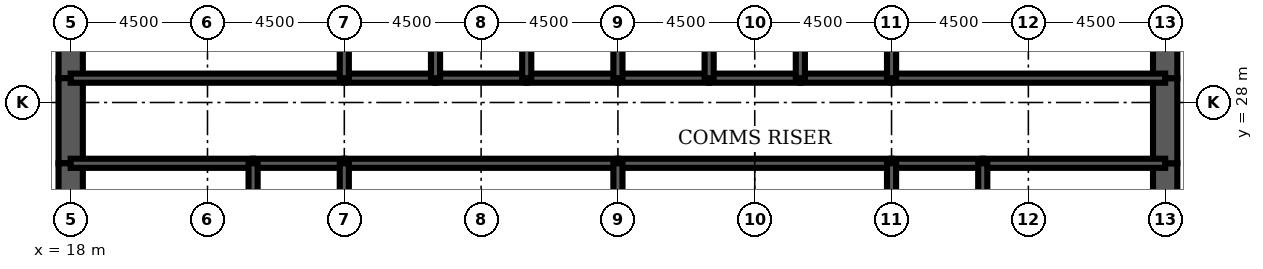
"""IFC4 building model, lengths in metres.
Left out: names, types, materials, properties, quantities, classifications, styles, units other than length and angle.
Written with IfcOpenShell. Run it as: python <this file> out.ifc"""

import sys

from ifc_helpers import new_model, si_unit, direction, frame, frame_2d, origin, place, context, subcontext, project, spatial, rectangle, extrude, element, fill, save


model = new_model("IFC4")
c1 = context("Model", 3, precision=1e-05, world=origin(), true_north=direction((0.0, 1.0)))
c2 = subcontext(c1, "Body", "Model", "MODEL_VIEW")
j1 = project(units=[si_unit("LENGTHUNIT", "METRE"), si_unit("PLANEANGLEUNIT", "RADIAN")], contexts=[c1])
p1 = place(None, origin())
s1 = spatial("IfcSite", under=j1, at=p1, CompositionType="ELEMENT")
p2 = place(p1, origin())
s2 = spatial("IfcBuilding", under=s1, at=p2, CompositionType="ELEMENT")
p3 = place(p2, frame((0.0, 0.0, 265.6)))
s3 = spatial("IfcBuildingStorey", under=s2, at=p3, CompositionType="ELEMENT", Elevation=265.6)
p4 = place(p3, frame((18.0, 32.0, 0.0), z_axis=(0.0, 0.0, 1.0), x_axis=(0.0, -1.0, 0.0)))
e1 = element("IfcWall", 1, at=p4, inside=s3, PredefinedType="SHEAR", context=c2, shape_type="SweptSolid", body=[
    extrude(rectangle(XDim=3.2, YDim=0.8, at=frame_2d((1.6, 0.0))), origin(), (0.0, 0.0, 1.0), 5.5),
])
p5 = place(p3, frame((18.0, 28.8, 0.0), z_axis=(0.0, 0.0, 1.0), x_axis=(0.0, -1.0, 0.0)))
e2 = element("IfcWall", 2, at=p5, inside=s3, PredefinedType="SHEAR", context=c2, shape_type="SweptSolid", body=[
    extrude(rectangle(XDim=2.8, YDim=0.8, at=frame_2d((1.4, 0.0))), origin(), (0.0, 0.0, 1.0), 5.5),
])
p6 = place(p5, frame((0.4, 0.0, 0.0)))
e3 = element("IfcOpeningElement", 3, at=p6, cuts=e2, PredefinedType="OPENING", context=c2, shape_type="SweptSolid", body=[
    extrude(rectangle(XDim=1.8, YDim=2.1, at=frame_2d((0.9, 1.05))), frame((0.0, 0.41, 0.0), z_axis=(0.0, -1.0, 0.0), x_axis=(1.0, 0.0, 0.0)), (0.0, 0.0, 1.0), 0.82),
])
for number, where, z_axis, x_axis in (
    (4, (18.0, 26.0, 0.0), (0.0, 0.0, 1.0), (0.0, -1.0, 0.0)),
    (5, (54.0, 22.0, 0.0), (0.0, 0.0, 1.0), (0.0, 1.0, 0.0)),
):
    element("IfcWall", number, at=place(p3, frame(where, z_axis=z_axis, x_axis=x_axis)), inside=s3, PredefinedType="SHEAR", context=c2, shape_type="SweptSolid", body=[
        extrude(rectangle(XDim=4.0, YDim=0.8, at=frame_2d((2.0, 0.0))), origin(), (0.0, 0.0, 1.0), 5.5),
    ])
p7 = place(p3, frame((54.0, 26.0, 0.0), z_axis=(0.0, 0.0, 1.0), x_axis=(0.0, 1.0, 0.0)))
e6 = element("IfcWall", 6, at=p7, inside=s3, PredefinedType="SHEAR", context=c2, shape_type="SweptSolid", body=[
    extrude(rectangle(XDim=2.8, YDim=0.8, at=frame_2d((1.4, 0.0))), origin(), (0.0, 0.0, 1.0), 5.5),
])
p8 = place(p7, frame((0.6, 0.0, 0.0)))
e7 = element("IfcOpeningElement", 7, at=p8, cuts=e6, PredefinedType="OPENING", context=c2, shape_type="SweptSolid", body=[
    extrude(rectangle(XDim=1.8, YDim=2.1, at=frame_2d((0.9, 1.05))), frame((0.0, 0.41, 0.0), z_axis=(0.0, -1.0, 0.0), x_axis=(1.0, 0.0, 0.0)), (0.0, 0.0, 1.0), 0.82),
])
p9 = place(p3, frame((54.0, 28.8, 0.0), z_axis=(0.0, 0.0, 1.0), x_axis=(0.0, 1.0, 0.0)))
e8 = element("IfcWall", 8, at=p9, inside=s3, PredefinedType="SHEAR", context=c2, shape_type="SweptSolid", body=[
    extrude(rectangle(XDim=3.2, YDim=0.8, at=frame_2d((1.6, 0.0))), origin(), (0.0, 0.0, 1.0), 5.5),
])
p10 = place(p3, frame((18.0, 28.8, 0.0), z_axis=(0.0, 0.0, 1.0), x_axis=(1.0, 0.0, 0.0)))
e9 = element("IfcWall", 9, at=p10, inside=s3, PredefinedType="SOLIDWALL", context=c2, shape_type="SweptSolid", body=[
    extrude(rectangle(XDim=9.0, YDim=0.3, at=frame_2d((4.5, 0.0))), origin(), (0.0, 0.0, 1.0), 5.5),
])
p11 = place(p10, frame((0.65, 0.0, 0.0)))
e10 = element("IfcOpeningElement", 10, at=p11, cuts=e9, PredefinedType="OPENING", context=c2, shape_type="SweptSolid", body=[
    extrude(rectangle(XDim=1.0, YDim=2.1, at=frame_2d((0.5, 1.05))), frame((0.0, 0.16, 0.0), z_axis=(0.0, -1.0, 0.0), x_axis=(1.0, 0.0, 0.0)), (0.0, 0.0, 1.0), 0.32),
])
p12 = place(p3, frame((27.0, 28.8, 0.0), z_axis=(0.0, 0.0, 1.0), x_axis=(1.0, 0.0, 0.0)))
e11 = element("IfcWall", 11, at=p12, inside=s3, PredefinedType="SOLIDWALL", context=c2, shape_type="SweptSolid", body=[
    extrude(rectangle(XDim=3.0, YDim=0.3, at=frame_2d((1.5, 0.0))), origin(), (0.0, 0.0, 1.0), 5.5),
])
p13 = place(p12, frame((0.95, 0.0, 0.0)))
e12 = element("IfcOpeningElement", 12, at=p13, cuts=e11, PredefinedType="OPENING", context=c2, shape_type="SweptSolid", body=[
    extrude(rectangle(XDim=1.1, YDim=2.2, at=frame_2d((0.55, 1.1))), frame((0.0, 0.16, 0.0), z_axis=(0.0, -1.0, 0.0), x_axis=(1.0, 0.0, 0.0)), (0.0, 0.0, 1.0), 0.32),
])
for number, where, z_axis, x_axis in (
    (13, (30.0, 28.8, 0.0), (0.0, 0.0, 1.0), (1.0, 0.0, 0.0)),
    (14, (33.0, 28.8, 0.0), (0.0, 0.0, 1.0), (1.0, 0.0, 0.0)),
    (15, (36.0, 28.8, 0.0), (0.0, 0.0, 1.0), (1.0, 0.0, 0.0)),
    (16, (39.0, 28.8, 0.0), (0.0, 0.0, 1.0), (1.0, 0.0, 0.0)),
):
    element("IfcWall", number, at=place(p3, frame(where, z_axis=z_axis, x_axis=x_axis)), inside=s3, PredefinedType="SOLIDWALL", context=c2, shape_type="SweptSolid", body=[
        extrude(rectangle(XDim=3.0, YDim=0.3, at=frame_2d((1.5, 0.0))), origin(), (0.0, 0.0, 1.0), 5.5),
    ])
p14 = place(p3, frame((42.0, 28.8, 0.0), z_axis=(0.0, 0.0, 1.0), x_axis=(1.0, 0.0, 0.0)))
e17 = element("IfcWall", 17, at=p14, inside=s3, PredefinedType="SOLIDWALL", context=c2, shape_type="SweptSolid", body=[
    extrude(rectangle(XDim=3.0, YDim=0.3, at=frame_2d((1.5, 0.0))), origin(), (0.0, 0.0, 1.0), 5.5),
])
p15 = place(p14, frame((0.95, 0.0, 0.0)))
e18 = element("IfcOpeningElement", 18, at=p15, cuts=e17, PredefinedType="OPENING", context=c2, shape_type="SweptSolid", body=[
    extrude(rectangle(XDim=1.1, YDim=2.2, at=frame_2d((0.55, 1.1))), frame((0.0, 0.16, 0.0), z_axis=(0.0, -1.0, 0.0), x_axis=(1.0, 0.0, 0.0)), (0.0, 0.0, 1.0), 0.32),
])
p16 = place(p3, frame((45.0, 28.8, 0.0), z_axis=(0.0, 0.0, 1.0), x_axis=(1.0, 0.0, 0.0)))
e19 = element("IfcWall", 19, at=p16, inside=s3, PredefinedType="SOLIDWALL", context=c2, shape_type="SweptSolid", body=[
    extrude(rectangle(XDim=9.0, YDim=0.3, at=frame_2d((4.5, 0.0))), origin(), (0.0, 0.0, 1.0), 5.5),
])
p17 = place(p16, frame((7.35, 0.0, 0.0)))
e20 = element("IfcOpeningElement", 20, at=p17, cuts=e19, PredefinedType="OPENING", context=c2, shape_type="SweptSolid", body=[
    extrude(rectangle(XDim=1.0, YDim=2.1, at=frame_2d((0.5, 1.05))), frame((0.0, 0.16, 0.0), z_axis=(0.0, -1.0, 0.0), x_axis=(1.0, 0.0, 0.0)), (0.0, 0.0, 1.0), 0.32),
])
p18 = place(p3, frame((18.0, 26.0, 0.0), z_axis=(0.0, 0.0, 1.0), x_axis=(1.0, 0.0, 0.0)))
e21 = element("IfcWall", 21, at=p18, inside=s3, PredefinedType="SOLIDWALL", context=c2, shape_type="SweptSolid", body=[
    extrude(rectangle(XDim=6.0, YDim=0.3, at=frame_2d((3.0, 0.0))), origin(), (0.0, 0.0, 1.0), 5.5),
])
p19 = place(p3, frame((24.0, 26.0, 0.0), z_axis=(0.0, 0.0, 1.0), x_axis=(1.0, 0.0, 0.0)))
e22 = element("IfcWall", 22, at=p19, inside=s3, PredefinedType="SOLIDWALL", context=c2, shape_type="SweptSolid", body=[
    extrude(rectangle(XDim=3.0, YDim=0.3, at=frame_2d((1.5, 0.0))), origin(), (0.0, 0.0, 1.0), 5.5),
])
for number, where, z_axis, x_axis in (
    (23, (27.0, 26.0, 0.0), (0.0, 0.0, 1.0), (1.0, 0.0, 0.0)),
    (24, (36.0, 26.0, 0.0), (0.0, 0.0, 1.0), (1.0, 0.0, 0.0)),
):
    element("IfcWall", number, at=place(p3, frame(where, z_axis=z_axis, x_axis=x_axis)), inside=s3, PredefinedType="SOLIDWALL", context=c2, shape_type="SweptSolid", body=[
        extrude(rectangle(XDim=9.0, YDim=0.3, at=frame_2d((4.5, 0.0))), origin(), (0.0, 0.0, 1.0), 5.5),
    ])
p20 = place(p3, frame((45.0, 26.0, 0.0), z_axis=(0.0, 0.0, 1.0), x_axis=(1.0, 0.0, 0.0)))
e25 = element("IfcWall", 25, at=p20, inside=s3, PredefinedType="SOLIDWALL", context=c2, shape_type="SweptSolid", body=[
    extrude(rectangle(XDim=3.0, YDim=0.3, at=frame_2d((1.5, 0.0))), origin(), (0.0, 0.0, 1.0), 5.5),
])
p21 = place(p3, frame((48.0, 26.0, 0.0), z_axis=(0.0, 0.0, 1.0), x_axis=(1.0, 0.0, 0.0)))
e26 = element("IfcWall", 26, at=p21, inside=s3, PredefinedType="SOLIDWALL", context=c2, shape_type="SweptSolid", body=[
    extrude(rectangle(XDim=6.0, YDim=0.3, at=frame_2d((3.0, 0.0))), origin(), (0.0, 0.0, 1.0), 5.5),
])
for number, where, z_axis, x_axis in (
    (27, (27.0, 28.8, 0.0), (0.0, 0.0, 1.0), (0.0, 1.0, 0.0)),
    (28, (30.0, 28.8, 0.0), (0.0, 0.0, 1.0), (0.0, 1.0, 0.0)),
    (29, (33.0, 28.8, 0.0), (0.0, 0.0, 1.0), (0.0, 1.0, 0.0)),
    (30, (36.0, 28.8, 0.0), (0.0, 0.0, 1.0), (0.0, 1.0, 0.0)),
    (31, (39.0, 28.8, 0.0), (0.0, 0.0, 1.0), (0.0, 1.0, 0.0)),
    (32, (42.0, 28.8, 0.0), (0.0, 0.0, 1.0), (0.0, 1.0, 0.0)),
    (33, (45.0, 28.8, 0.0), (0.0, 0.0, 1.0), (0.0, 1.0, 0.0)),
):
    element("IfcWall", number, at=place(p3, frame(where, z_axis=z_axis, x_axis=x_axis)), inside=s3, PredefinedType="SOLIDWALL", context=c2, shape_type="SweptSolid", body=[
        extrude(rectangle(XDim=3.2, YDim=0.3, at=frame_2d((1.6, 0.0))), origin(), (0.0, 0.0, 1.0), 5.5),
    ])
for number, where, z_axis, x_axis in (
    (34, (24.0, 22.0, 0.0), (0.0, 0.0, 1.0), (0.0, 1.0, 0.0)),
    (35, (27.0, 22.0, 0.0), (0.0, 0.0, 1.0), (0.0, 1.0, 0.0)),
    (36, (36.0, 22.0, 0.0), (0.0, 0.0, 1.0), (0.0, 1.0, 0.0)),
    (37, (45.0, 22.0, 0.0), (0.0, 0.0, 1.0), (0.0, 1.0, 0.0)),
    (38, (48.0, 22.0, 0.0), (0.0, 0.0, 1.0), (0.0, 1.0, 0.0)),
):
    element("IfcWall", number, at=place(p3, frame(where, z_axis=z_axis, x_axis=x_axis)), inside=s3, PredefinedType="SOLIDWALL", context=c2, shape_type="SweptSolid", body=[
        extrude(rectangle(XDim=4.0, YDim=0.3, at=frame_2d((2.0, 0.0))), origin(), (0.0, 0.0, 1.0), 5.5),
    ])
p22 = place(p3, frame((39.0, 22.15, 0.0), z_axis=(0.0, 0.0, 1.0), x_axis=(0.0, 1.0, 0.0)))
e39 = element("IfcWall", 39, at=p22, inside=s3, PredefinedType="PARTITIONING", context=c2, shape_type="SweptSolid", body=[
    extrude(rectangle(XDim=3.7, YDim=0.15, at=frame_2d((1.85, 0.0))), origin(), (0.0, 0.0, 1.0), 3.0),
])
p23 = place(p22, frame((2.2, 0.0, 0.0)))
e40 = element("IfcOpeningElement", 40, at=p23, cuts=e39, PredefinedType="OPENING", context=c2, shape_type="SweptSolid", body=[
    extrude(rectangle(XDim=1.0, YDim=2.1, at=frame_2d((0.5, 1.05))), frame((0.0, 0.085, 0.0), z_axis=(0.0, -1.0, 0.0), x_axis=(1.0, 0.0, 0.0)), (0.0, 0.0, 1.0), 0.17),
])
p24 = place(p23, origin())
e41 = element("IfcDoor", 41, at=p24, inside=s3, OperationType="SINGLE_SWING_RIGHT", PredefinedType="DOOR", context=c2, shape_type="SweptSolid", body=[
    extrude(rectangle(XDim=1.0, YDim=2.1, at=frame_2d((0.5, 1.05))), frame((0.0, 0.025, 0.0), z_axis=(0.0, -1.0, 0.0), x_axis=(1.0, 0.0, 0.0)), (0.0, 0.0, 1.0), 0.05),
])
fill(e40, e41)
p25 = place(p15, origin())
e42 = element("IfcDoor", 42, at=p25, inside=s3, OperationType="DOUBLE_DOOR_SLIDING", PredefinedType="USERDEFINED", context=c2, shape_type="SweptSolid", body=[
    extrude(rectangle(XDim=1.1, YDim=2.2, at=frame_2d((0.55, 1.1))), frame((0.0, 0.025, 0.0), z_axis=(0.0, -1.0, 0.0), x_axis=(1.0, 0.0, 0.0)), (0.0, 0.0, 1.0), 0.05),
])
fill(e18, e42)
p26 = place(p13, origin())
e43 = element("IfcDoor", 43, at=p26, inside=s3, OperationType="DOUBLE_DOOR_SLIDING", PredefinedType="USERDEFINED", context=c2, shape_type="SweptSolid", body=[
    extrude(rectangle(XDim=1.1, YDim=2.2, at=frame_2d((0.55, 1.1))), frame((0.0, 0.025, 0.0), z_axis=(0.0, -1.0, 0.0), x_axis=(1.0, 0.0, 0.0)), (0.0, 0.0, 1.0), 0.05),
])
fill(e12, e43)
p27 = place(p11, origin())
e44 = element("IfcDoor", 44, at=p27, inside=s3, OperationType="SINGLE_SWING_LEFT", PredefinedType="DOOR", context=c2, shape_type="SweptSolid", body=[
    extrude(rectangle(XDim=1.0, YDim=2.1, at=frame_2d((0.5, 1.05))), frame((0.0, 0.025, 0.0), z_axis=(0.0, -1.0, 0.0), x_axis=(1.0, 0.0, 0.0)), (0.0, 0.0, 1.0), 0.05),
])
fill(e10, e44)
p28 = place(p17, origin())
e45 = element("IfcDoor", 45, at=p28, inside=s3, OperationType="SINGLE_SWING_RIGHT", PredefinedType="DOOR", context=c2, shape_type="SweptSolid", body=[
    extrude(rectangle(XDim=1.0, YDim=2.1, at=frame_2d((0.5, 1.05))), frame((0.0, 0.025, 0.0), z_axis=(0.0, -1.0, 0.0), x_axis=(1.0, 0.0, 0.0)), (0.0, 0.0, 1.0), 0.05),
])
fill(e20, e45)
p29 = place(p6, origin())
e46 = element("IfcDoor", 46, at=p29, inside=s3, OperationType="SINGLE_SWING_LEFT", PredefinedType="DOOR", context=c2, shape_type="SweptSolid", body=[
    extrude(rectangle(XDim=1.8, YDim=2.1, at=frame_2d((0.9, 1.05))), frame((0.0, 0.4, 0.0), z_axis=(0.0, -1.0, 0.0), x_axis=(1.0, 0.0, 0.0)), (0.0, 0.0, 1.0), 0.8),
])
fill(e3, e46)
p30 = place(p8, origin())
e47 = element("IfcDoor", 47, at=p30, inside=s3, OperationType="SINGLE_SWING_LEFT", PredefinedType="DOOR", context=c2, shape_type="SweptSolid", body=[
    extrude(rectangle(XDim=1.8, YDim=2.1, at=frame_2d((0.9, 1.05))), frame((0.0, 0.4, 0.0), z_axis=(0.0, -1.0, 0.0), x_axis=(1.0, 0.0, 0.0)), (0.0, 0.0, 1.0), 0.8),
])
fill(e7, e47)
save(model, sys.argv[1])
